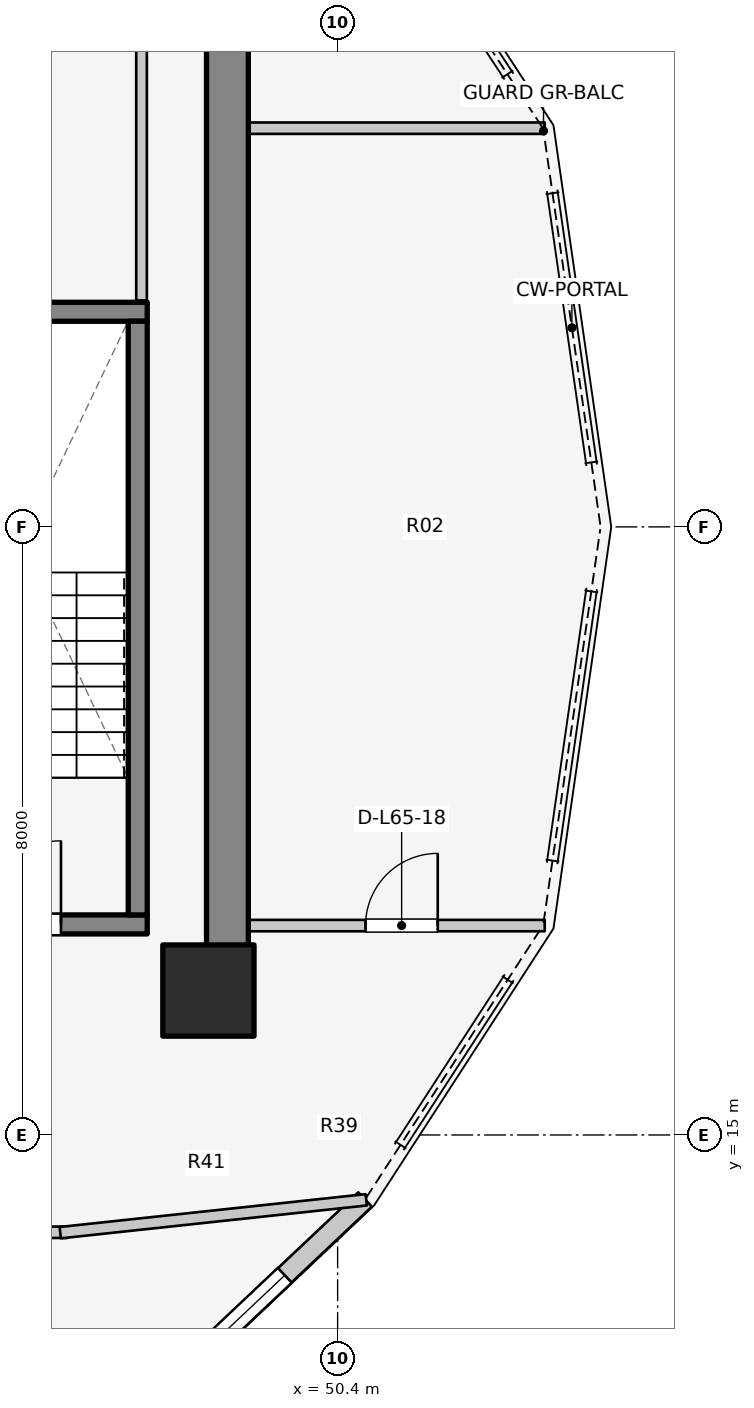
"""IFC4 building model, lengths in metres.
Left out: names, types, materials, properties, quantities, classifications, styles, units other than length and angle.
Written with IfcOpenShell. Run it as: python <this file> out.ifc"""

import sys

from ifc_helpers import new_model, si_unit, direction, frame, frame_2d, origin, origin_2d, place, context, subcontext, project, spatial, rectangle, extrude, element, fill, save


model = new_model("IFC4")
c1 = context("Model", 3, precision=1e-05, world=origin(), true_north=direction((0.0, 1.0)))
c2 = subcontext(c1, "Body", "Model", "MODEL_VIEW")
j1 = project(units=[si_unit("LENGTHUNIT", "METRE"), si_unit("PLANEANGLEUNIT", "RADIAN")], contexts=[c1])
p1 = place(None, origin())
s1 = spatial("IfcSite", under=j1, at=p1, CompositionType="ELEMENT")
p2 = place(p1, origin())
s2 = spatial("IfcBuilding", under=s1, at=p2, CompositionType="ELEMENT")
p3 = place(p2, frame((0.0, 0.0, 214.0)))
s3 = spatial("IfcBuildingStorey", under=s2, at=p3, CompositionType="ELEMENT", Elevation=214.0)
p4 = place(p3, frame((48.95, 17.05, 0.0), z_axis=(0.0, 0.0, 1.0), x_axis=(0.0, 1.0, 0.0)))
e1 = element("IfcWall", 1, at=p4, inside=s3, PredefinedType="SHEAR", context=c2, shape_type="SweptSolid", body=[
    extrude(rectangle(XDim=12.8, YDim=0.55, at=frame_2d((6.4, 0.0))), origin(), (0.0, 0.0, 1.0), 3.1),
])
p5 = place(p3, frame((44.525, 17.77, 0.0), z_axis=(0.0, 0.0, 1.0), x_axis=(1.0, 0.0, 0.0)))
e2 = element("IfcWall", 2, at=p5, inside=s3, PredefinedType="SOLIDWALL", context=c2, shape_type="SweptSolid", body=[
    extrude(rectangle(XDim=3.37, YDim=0.25, at=frame_2d((1.685, 0.0))), origin(), (0.0, 0.0, 1.0), 3.1),
])
p6 = place(p5, frame((1.135, 0.0, 0.0)))
e3 = element("IfcOpeningElement", 3, at=p6, cuts=e2, PredefinedType="OPENING", context=c2, shape_type="SweptSolid", body=[
    extrude(rectangle(XDim=1.1, YDim=2.1, at=frame_2d((0.55, 1.05))), frame((0.0, 0.135, 0.0), z_axis=(0.0, -1.0, 0.0), x_axis=(1.0, 0.0, 0.0)), (0.0, 0.0, 1.0), 0.27),
])
p7 = place(p3, frame((44.525, 25.83, 0.0), z_axis=(0.0, 0.0, 1.0), x_axis=(1.0, 0.0, 0.0)))
e4 = element("IfcWall", 4, at=p7, inside=s3, PredefinedType="SOLIDWALL", context=c2, shape_type="SweptSolid", body=[
    extrude(rectangle(XDim=3.37, YDim=0.25, at=frame_2d((1.685, 0.0))), origin(), (0.0, 0.0, 1.0), 3.1),
])
p8 = place(p3, frame((47.77, 17.895, 0.0), z_axis=(0.0, 0.0, 1.0), x_axis=(0.0, 1.0, 0.0)))
e5 = element("IfcWall", 5, at=p8, inside=s3, PredefinedType="SOLIDWALL", context=c2, shape_type="SweptSolid", body=[
    extrude(rectangle(XDim=7.81, YDim=0.25, at=frame_2d((3.905, 0.0))), origin(), (0.0, 0.0, 1.0), 3.1),
])
p9 = place(p3, frame((48.7, 16.9, 0.0), z_axis=(0.0, 0.0, 1.0), x_axis=(1.0, 0.0, 0.0)))
e6 = element("IfcColumn", 6, at=p9, inside=s3, PredefinedType="COLUMN", context=c2, shape_type="SweptSolid", body=[
    extrude(rectangle(XDim=1.2, YDim=1.2, at=origin_2d()), origin(), (0.0, 0.0, 1.0), 3.1),
])
p10 = place(p3, frame((47.558, 11.128, 0.0), z_axis=(0.0, 0.0, 1.0), x_axis=(0.72731899451, 0.686299555752, 0.0)))
e7 = element("IfcWall", 7, at=p10, inside=s3, PredefinedType="STANDARD", context=c2, shape_type="SweptSolid", body=[
    extrude(rectangle(XDim=4.404, YDim=0.26, at=frame_2d((2.202, 0.0))), origin(), (0.0, 0.0, 1.0), 2.85),
])
p11 = place(p10, frame((1.452, 0.0, 0.75)))
e8 = element("IfcOpeningElement", 8, at=p11, cuts=e7, PredefinedType="OPENING", context=c2, shape_type="SweptSolid", body=[
    extrude(rectangle(XDim=1.5, YDim=1.6, at=frame_2d((0.75, 0.8))), frame((0.0, 0.14, 0.0), z_axis=(0.0, -1.0, 0.0), x_axis=(1.0, 0.0, 0.0)), (0.0, 0.0, 1.0), 0.28),
])
p12 = place(p3, frame((47.82, 25.98, 0.0), z_axis=(0.0, 0.0, 1.0), x_axis=(0.0, 1.0, 0.0)))
e9 = element("IfcWall", 9, at=p12, inside=s3, PredefinedType="PLUMBINGWALL", context=c2, shape_type="SweptSolid", body=[
    extrude(rectangle(XDim=3.88, YDim=0.14, at=frame_2d((1.94, 0.0))), origin(), (0.0, 0.0, 1.0), 2.855),
])
p13 = place(p3, frame((48.95, 17.755, 0.0), z_axis=(0.0, 0.0, 1.0), x_axis=(1.0, 0.0, 0.0)))
e10 = element("IfcWall", 10, at=p13, inside=s3, PredefinedType="PARTITIONING", context=c2, shape_type="SweptSolid", body=[
    extrude(rectangle(XDim=4.175, YDim=0.15, at=frame_2d((2.087, 0.0))), origin(), (0.0, 0.0, 1.0), 2.855),
])
p14 = place(p13, frame((1.817, 0.0, 0.0)))
e11 = element("IfcOpeningElement", 11, at=p14, cuts=e10, PredefinedType="OPENING", context=c2, shape_type="SweptSolid", body=[
    extrude(rectangle(XDim=0.95, YDim=2.1, at=frame_2d((0.475, 1.05))), frame((0.0, 0.085, 0.0), z_axis=(0.0, -1.0, 0.0), x_axis=(1.0, 0.0, 0.0)), (0.0, 0.0, 1.0), 0.17),
])
p15 = place(p3, frame((48.95, 28.245, 0.0), z_axis=(0.0, 0.0, 1.0), x_axis=(1.0, 0.0, 0.0)))
e12 = element("IfcWall", 12, at=p15, inside=s3, PredefinedType="PARTITIONING", context=c2, shape_type="SweptSolid", body=[
    extrude(rectangle(XDim=4.175, YDim=0.15, at=frame_2d((2.087, 0.0))), origin(), (0.0, 0.0, 1.0), 2.855),
])
p16 = place(p3, frame((39.33, 13.72, 0.0), z_axis=(0.0, 0.0, 1.0), x_axis=(1.0, 0.0, 0.0)))
e13 = element("IfcWall", 13, at=p16, inside=s3, PredefinedType="PARTITIONING", context=c2, shape_type="SweptSolid", body=[
    extrude(rectangle(XDim=7.52, YDim=0.15, at=frame_2d((3.76, 0.0))), origin(), (0.0, 0.0, 1.0), 2.376),
])
p17 = place(p16, frame((5.22, 0.0, 0.0)))
e14 = element("IfcOpeningElement", 14, at=p17, cuts=e13, PredefinedType="OPENING", context=c2, shape_type="SweptSolid", body=[
    extrude(rectangle(XDim=0.9, YDim=2.1, at=frame_2d((0.45, 1.05))), frame((0.0, 0.085, 0.0), z_axis=(0.0, -1.0, 0.0), x_axis=(1.0, 0.0, 0.0)), (0.0, 0.0, 1.0), 0.17),
])
p18 = place(p3, frame((46.75, 13.715, 0.0), z_axis=(0.0, 0.0, 1.0), x_axis=(0.994275802046, 0.106843949134, 0.0)))
e15 = element("IfcWall", 15, at=p18, inside=s3, PredefinedType="PARTITIONING", context=c2, shape_type="SweptSolid", body=[
    extrude(rectangle(XDim=4.049, YDim=0.15, at=frame_2d((2.024, 0.0))), origin(), (0.0, 0.0, 1.0), 2.22),
])
p19 = place(p11, origin())
e16 = element("IfcWindow", 16, at=p19, inside=s3, PartitioningType="SINGLE_PANEL", PredefinedType="WINDOW", context=c2, shape_type="SweptSolid", body=[
    extrude(rectangle(XDim=1.5, YDim=1.6, at=frame_2d((0.75, 0.8))), frame((0.0, 0.03, 0.0), z_axis=(0.0, -1.0, 0.0), x_axis=(1.0, 0.0, 0.0)), (0.0, 0.0, 1.0), 0.06),
])
fill(e8, e16)
p20 = place(p6, origin())
e17 = element("IfcDoor", 17, at=p20, inside=s3, OperationType="SINGLE_SWING_RIGHT", PredefinedType="DOOR", context=c2, shape_type="SweptSolid", body=[
    extrude(rectangle(XDim=1.1, YDim=2.1, at=frame_2d((0.55, 1.05))), frame((0.0, 0.025, 0.0), z_axis=(0.0, -1.0, 0.0), x_axis=(1.0, 0.0, 0.0)), (0.0, 0.0, 1.0), 0.05),
])
fill(e3, e17)
p21 = place(p14, origin())
e18 = element("IfcDoor", 18, at=p21, inside=s3, OperationType="SINGLE_SWING_RIGHT", PredefinedType="DOOR", context=c2, shape_type="SweptSolid", body=[
    extrude(rectangle(XDim=0.95, YDim=2.1, at=frame_2d((0.475, 1.05))), frame((0.0, 0.025, 0.0), z_axis=(0.0, -1.0, 0.0), x_axis=(1.0, 0.0, 0.0)), (0.0, 0.0, 1.0), 0.05),
])
fill(e11, e18)
save(model, sys.argv[1])
